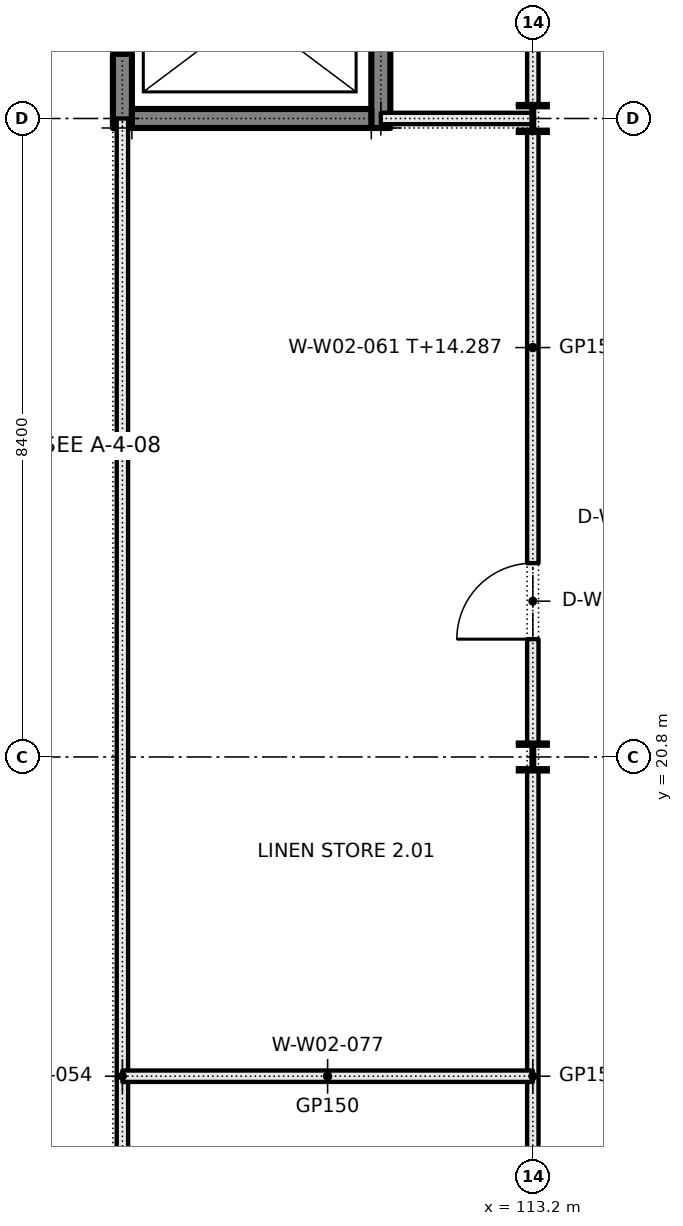
"""IFC4 building model, lengths in metres.
Left out: names, types, materials, properties, quantities, classifications, styles, units other than length and angle.
Written with IfcOpenShell. Run it as: python <this file> out.ifc"""

import sys

from ifc_helpers import new_model, si_unit, direction, frame, frame_2d, origin, origin_2d, place, context, subcontext, project, spatial, rectangle, i_section, extrude, element, fill, save


model = new_model("IFC4")
c1 = context("Model", 3, precision=1e-05, world=origin(), true_north=direction((0.0, 1.0)))
c2 = subcontext(c1, "Body", "Model", "MODEL_VIEW")
j1 = project(units=[si_unit("LENGTHUNIT", "METRE"), si_unit("PLANEANGLEUNIT", "RADIAN")], contexts=[c1])
p1 = place(None, origin())
s1 = spatial("IfcSite", under=j1, at=p1, CompositionType="ELEMENT")
p2 = place(p1, origin())
s2 = spatial("IfcBuilding", under=s1, at=p2, CompositionType="ELEMENT")
p3 = place(p2, frame((0.0, 0.0, 10.2)))
s3 = spatial("IfcBuildingStorey", under=s2, at=p3, CompositionType="ELEMENT", Elevation=10.2)
p4 = place(p3, frame((107.8, 29.075, 0.0), z_axis=(0.0, 0.0, 1.0), x_axis=(0.0, 1.0, 0.0)))
e1 = element("IfcWall", 1, at=p4, inside=s3, PredefinedType="SOLIDWALL", context=c2, shape_type="SweptSolid", body=[
    extrude(rectangle(XDim=3.05, YDim=0.25, at=frame_2d((1.525, 0.0))), origin(), (0.0, 0.0, 1.0), 4.8),
])
p5 = place(p4, frame((0.975, 0.0, 0.0)))
e2 = element("IfcOpeningElement", 2, at=p5, cuts=e1, PredefinedType="OPENING", context=c2, shape_type="SweptSolid", body=[
    extrude(rectangle(XDim=1.1, YDim=2.1, at=frame_2d((0.55, 1.05))), frame((0.0, 0.135, 0.0), z_axis=(0.0, -1.0, 0.0), x_axis=(1.0, 0.0, 0.0)), (0.0, 0.0, 1.0), 0.27),
])
p6 = place(p3, frame((111.2, 29.075, 0.0), z_axis=(0.0, 0.0, 1.0), x_axis=(0.0, 1.0, 0.0)))
e3 = element("IfcWall", 3, at=p6, inside=s3, PredefinedType="SOLIDWALL", context=c2, shape_type="SweptSolid", body=[
    extrude(rectangle(XDim=3.05, YDim=0.25, at=frame_2d((1.525, 0.0))), origin(), (0.0, 0.0, 1.0), 4.8),
])
p7 = place(p3, frame((107.925, 29.2, 0.0), z_axis=(0.0, 0.0, 1.0), x_axis=(1.0, 0.0, 0.0)))
e4 = element("IfcWall", 4, at=p7, inside=s3, PredefinedType="SOLIDWALL", context=c2, shape_type="SweptSolid", body=[
    extrude(rectangle(XDim=3.15, YDim=0.25, at=frame_2d((1.575, 0.0))), origin(), (0.0, 0.0, 1.0), 4.8),
])
for number, where, z_axis, x_axis in (
    (5, (113.2, 20.8, 0.0), (0.0, 0.0, 1.0), (1.0, 0.0, 0.0)),
    (6, (113.2, 29.2, 0.0), (0.0, 0.0, 1.0), (1.0, 0.0, 0.0)),
):
    element("IfcColumn", number, at=place(p3, frame(where, z_axis=z_axis, x_axis=x_axis)), inside=s3, PredefinedType="COLUMN", context=c2, shape_type="SweptSolid", body=[
        extrude(i_section(OverallWidth=0.368, OverallDepth=0.356, WebThickness=0.011, FlangeThickness=0.018, FilletRadius=0.015, at=origin_2d()), origin(), (0.0, 0.0, 1.0), 4.8),
    ])
p8 = place(p3, frame((107.8, 4.0, 0.0), z_axis=(0.0, 0.0, 1.0), x_axis=(0.0, 1.0, 0.0)))
e7 = element("IfcWall", 7, at=p8, inside=s3, PredefinedType="PARTITIONING", context=c2, shape_type="SweptSolid", body=[
    extrude(rectangle(XDim=25.2, YDim=0.15, at=frame_2d((12.6, 0.0))), origin(), (0.0, 0.0, 1.0), 4.8),
])
p9 = place(p3, frame((113.2, 12.578, 0.0), z_axis=(0.0, 0.0, 1.0), x_axis=(0.0, 1.0, 0.0)))
e8 = element("IfcWall", 8, at=p9, inside=s3, PredefinedType="PARTITIONING", context=c2, shape_type="SweptSolid", body=[
    extrude(rectangle(XDim=8.044, YDim=0.15, at=frame_2d((4.022, 0.0))), origin(), (0.0, 0.0, 1.0), 4.087),
])
p10 = place(p3, frame((113.2, 20.978, 0.0), z_axis=(0.0, 0.0, 1.0), x_axis=(0.0, 1.0, 0.0)))
e9 = element("IfcWall", 9, at=p10, inside=s3, PredefinedType="PARTITIONING", context=c2, shape_type="SweptSolid", body=[
    extrude(rectangle(XDim=8.044, YDim=0.15, at=frame_2d((4.022, 0.0))), origin(), (0.0, 0.0, 1.0), 4.087),
])
p11 = place(p10, frame((1.372, 0.0, 0.0)))
e10 = element("IfcOpeningElement", 10, at=p11, cuts=e9, PredefinedType="OPENING", context=c2, shape_type="SweptSolid", body=[
    extrude(rectangle(XDim=1.0, YDim=2.1, at=frame_2d((0.5, 1.05))), frame((0.0, 0.085, 0.0), z_axis=(0.0, -1.0, 0.0), x_axis=(1.0, 0.0, 0.0)), (0.0, 0.0, 1.0), 0.17),
])
p12 = place(p3, frame((113.2, 29.378, 0.0), z_axis=(0.0, 0.0, 1.0), x_axis=(0.0, 1.0, 0.0)))
e11 = element("IfcWall", 11, at=p12, inside=s3, PredefinedType="PARTITIONING", context=c2, shape_type="SweptSolid", body=[
    extrude(rectangle(XDim=7.022, YDim=0.15, at=frame_2d((3.511, 0.0))), origin(), (0.0, 0.0, 1.0), 4.087),
])
p13 = place(p12, frame((0.772, 0.0, 0.0)))
e12 = element("IfcOpeningElement", 12, at=p13, cuts=e11, PredefinedType="OPENING", context=c2, shape_type="SweptSolid", body=[
    extrude(rectangle(XDim=0.9, YDim=2.1, at=frame_2d((0.45, 1.05))), frame((0.0, 0.085, 0.0), z_axis=(0.0, -1.0, 0.0), x_axis=(1.0, 0.0, 0.0)), (0.0, 0.0, 1.0), 0.17),
])
p14 = place(p12, frame((2.972, 0.0, 0.0)))
e13 = element("IfcOpeningElement", 13, at=p14, cuts=e11, PredefinedType="OPENING", context=c2, shape_type="SweptSolid", body=[
    extrude(rectangle(XDim=0.9, YDim=2.1, at=frame_2d((0.45, 1.05))), frame((0.0, 0.085, 0.0), z_axis=(0.0, -1.0, 0.0), x_axis=(1.0, 0.0, 0.0)), (0.0, 0.0, 1.0), 0.17),
])
p15 = place(p12, frame((5.172, 0.0, 0.0)))
e14 = element("IfcOpeningElement", 14, at=p15, cuts=e11, PredefinedType="OPENING", context=c2, shape_type="SweptSolid", body=[
    extrude(rectangle(XDim=0.9, YDim=2.1, at=frame_2d((0.45, 1.05))), frame((0.0, 0.085, 0.0), z_axis=(0.0, -1.0, 0.0), x_axis=(1.0, 0.0, 0.0)), (0.0, 0.0, 1.0), 0.17),
])
p16 = place(p3, frame((107.8, 16.6, 0.0), z_axis=(0.0, 0.0, 1.0), x_axis=(1.0, 0.0, 0.0)))
e15 = element("IfcWall", 15, at=p16, inside=s3, PredefinedType="PARTITIONING", context=c2, shape_type="SweptSolid", body=[
    extrude(rectangle(XDim=5.4, YDim=0.15, at=frame_2d((2.7, 0.0))), origin(), (0.0, 0.0, 1.0), 4.8),
])
p17 = place(p3, frame((111.2, 29.2, 0.0), z_axis=(0.0, 0.0, 1.0), x_axis=(1.0, 0.0, 0.0)))
e16 = element("IfcWall", 16, at=p17, inside=s3, PredefinedType="PARTITIONING", context=c2, shape_type="SweptSolid", body=[
    extrude(rectangle(XDim=1.994, YDim=0.15, at=frame_2d((0.997, 0.0))), origin(), (0.0, 0.0, 1.0), 4.008),
])
p18 = place(p5, origin())
e17 = element("IfcDoor", 17, at=p18, inside=s3, OperationType="SLIDING_TO_LEFT", PredefinedType="DOOR", context=c2, shape_type="SweptSolid", body=[
    extrude(rectangle(XDim=1.1, YDim=2.1, at=frame_2d((0.55, 1.05))), frame((0.0, 0.025, 0.0), z_axis=(0.0, -1.0, 0.0), x_axis=(1.0, 0.0, 0.0)), (0.0, 0.0, 1.0), 0.05),
])
fill(e2, e17)
p19 = place(p11, origin())
e18 = element("IfcDoor", 18, at=p19, inside=s3, OperationType="SINGLE_SWING_LEFT", PredefinedType="DOOR", context=c2, shape_type="SweptSolid", body=[
    extrude(rectangle(XDim=1.0, YDim=2.1, at=frame_2d((0.5, 1.05))), frame((0.0, 0.025, 0.0), z_axis=(0.0, -1.0, 0.0), x_axis=(1.0, 0.0, 0.0)), (0.0, 0.0, 1.0), 0.05),
])
fill(e10, e18)
save(model, sys.argv[1])
